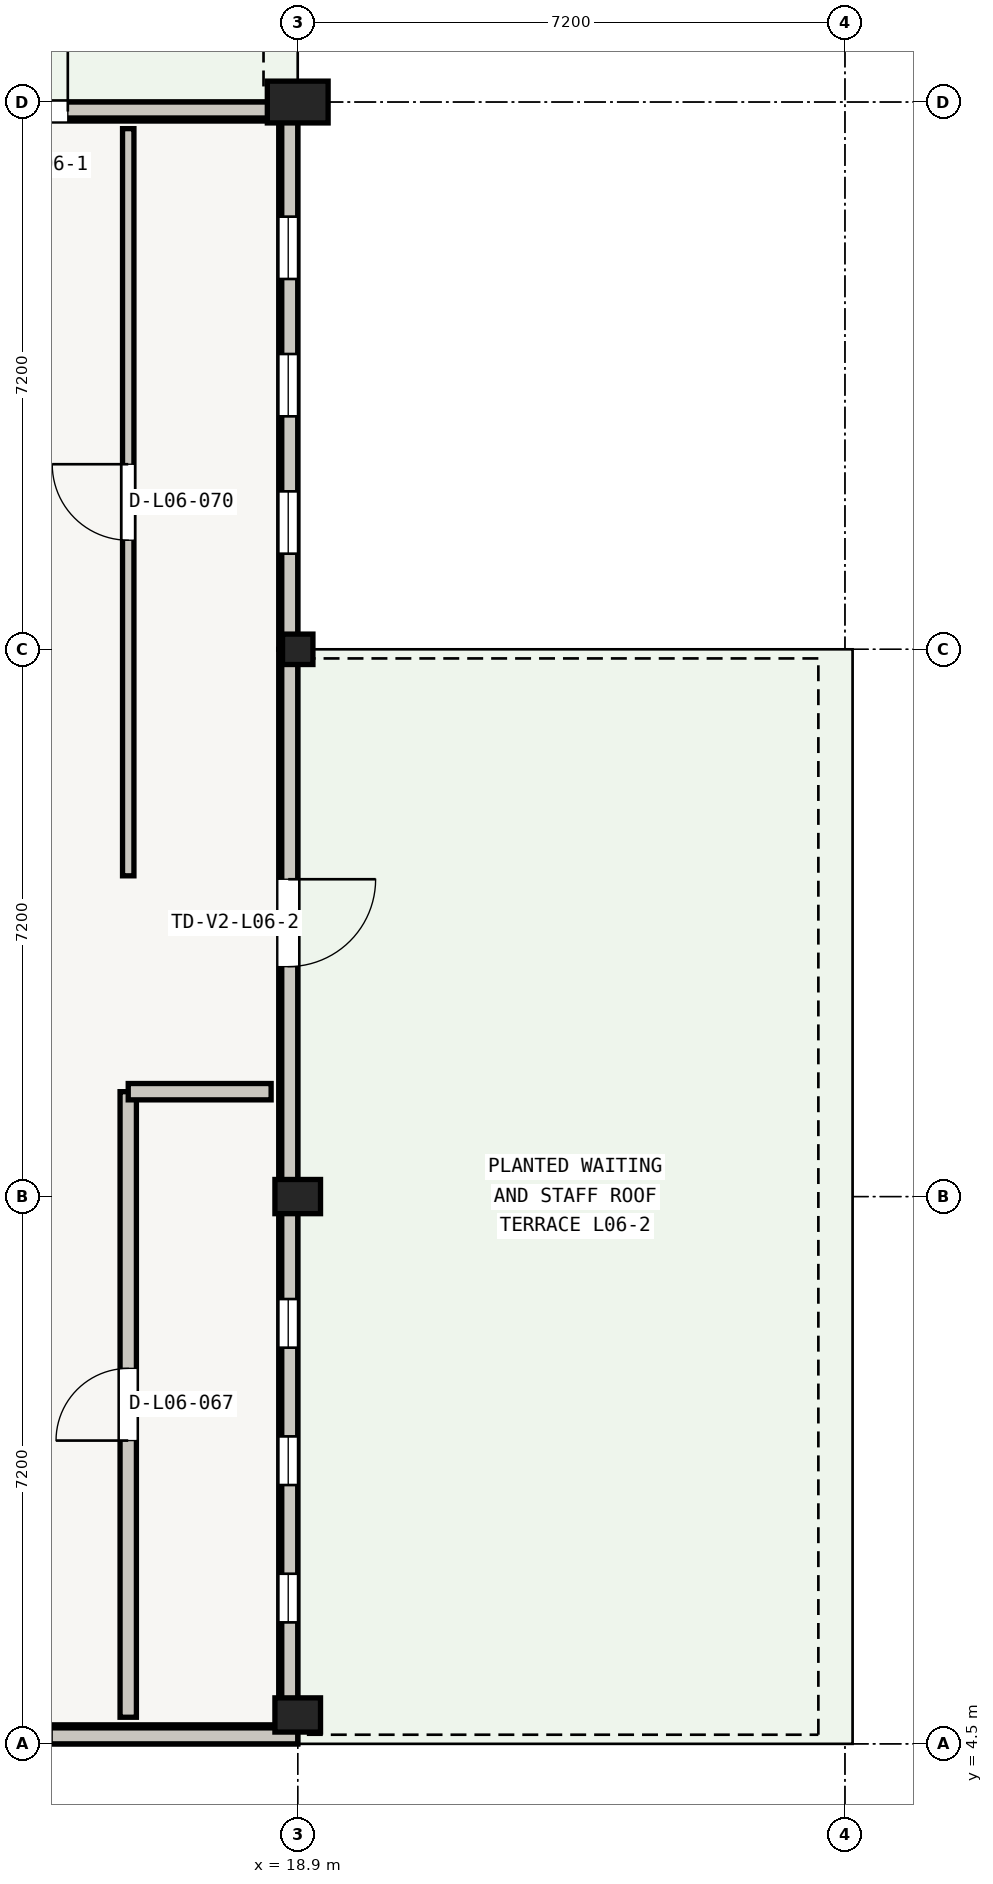
"""IFC4 building model, lengths in metres.
Left out: names, types, materials, properties, quantities, classifications, styles, units other than length and angle.
Written with IfcOpenShell. Run it as: python <this file> out.ifc"""

import sys

from ifc_helpers import new_model, si_unit, direction, frame, frame_2d, origin, origin_2d, place, context, subcontext, project, spatial, rectangle, extrude, element, fill, save


model = new_model("IFC4")
c1 = context("Model", 3, precision=1e-05, world=origin(), true_north=direction((0.0, 1.0)))
c2 = subcontext(c1, "Body", "Model", "MODEL_VIEW")
j1 = project(units=[si_unit("LENGTHUNIT", "METRE"), si_unit("PLANEANGLEUNIT", "RADIAN")], contexts=[c1])
p1 = place(None, origin())
s1 = spatial("IfcSite", under=j1, at=p1, CompositionType="ELEMENT")
p2 = place(p1, origin())
s2 = spatial("IfcBuilding", under=s1, at=p2, CompositionType="ELEMENT")
p3 = place(p2, frame((0.0, 0.0, 25.05)))
s3 = spatial("IfcBuildingStorey", under=s2, at=p3, CompositionType="ELEMENT", Elevation=25.05)
for number, where, z_axis, x_axis in (
    (1, (18.9, 4.88, 0.0), (0.0, 0.0, 1.0), (1.0, 0.0, 0.0)),
    (2, (18.9, 11.7, 0.0), (0.0, 0.0, 1.0), (1.0, 0.0, 0.0)),
):
    element("IfcColumn", number, at=place(p3, frame(where, z_axis=z_axis, x_axis=x_axis)), inside=s3, PredefinedType="COLUMN", context=c2, shape_type="SweptSolid", body=[
        extrude(rectangle(XDim=0.6, YDim=0.45, at=origin_2d()), origin(), (0.0, 0.0, 1.0), 3.66),
    ])
p4 = place(p3, frame((18.9, 18.9, 0.0), z_axis=(0.0, 0.0, 1.0), x_axis=(1.0, 0.0, 0.0)))
e3 = element("IfcColumn", 3, at=p4, inside=s3, PredefinedType="COLUMN", context=c2, shape_type="SweptSolid", body=[
    extrude(rectangle(XDim=0.4, YDim=0.4, at=origin_2d()), origin(), (0.0, 0.0, 1.0), 3.66),
])
p5 = place(p3, frame((18.9, 26.1, 0.0), z_axis=(0.0, 0.0, 1.0), x_axis=(1.0, 0.0, 0.0)))
e4 = element("IfcColumn", 4, at=p5, inside=s3, PredefinedType="COLUMN", context=c2, shape_type="SweptSolid", body=[
    extrude(rectangle(XDim=0.8, YDim=0.55, at=origin_2d()), origin(), (0.0, 0.0, 1.0), 3.66),
])
p6 = place(p3, frame((11.7, 25.975, 0.0), z_axis=(0.0, 0.0, 1.0), x_axis=(1.0, 0.0, 0.0)))
e5 = element("IfcWall", 5, at=p6, inside=s3, PredefinedType="STANDARD", context=c2, shape_type="SweptSolid", body=[
    extrude(rectangle(XDim=7.2, YDim=0.25, at=frame_2d((3.6, 0.0))), origin(), (0.0, 0.0, 1.0), 3.195),
])
p7 = place(p6, frame((3.025, 0.0, 0.19)))
e6 = element("IfcOpeningElement", 6, at=p7, cuts=e5, PredefinedType="OPENING", context=c2, shape_type="SweptSolid", body=[
    extrude(rectangle(XDim=1.15, YDim=2.02, at=frame_2d((0.575, 1.01))), frame((0.0, 0.125, 0.0), z_axis=(0.0, -1.0, 0.0), x_axis=(1.0, 0.0, 0.0)), (0.0, 0.0, 1.0), 0.25),
])
p8 = place(p3, frame((18.775, 25.85, 0.0), z_axis=(0.0, 0.0, 1.0), x_axis=(0.0, -1.0, 0.0)))
e7 = element("IfcWall", 7, at=p8, inside=s3, PredefinedType="STANDARD", context=c2, shape_type="SweptSolid", body=[
    extrude(rectangle(XDim=6.95, YDim=0.25, at=frame_2d((3.475, 0.0))), origin(), (0.0, 0.0, 1.0), 3.165),
])
p9 = place(p8, frame((1.258, 0.0, 0.55)))
e8 = element("IfcOpeningElement", 8, at=p9, cuts=e7, PredefinedType="OPENING", context=c2, shape_type="SweptSolid", body=[
    extrude(rectangle(XDim=0.82, YDim=2.2, at=frame_2d((0.41, 1.1))), frame((0.0, 0.125, 0.0), z_axis=(0.0, -1.0, 0.0), x_axis=(1.0, 0.0, 0.0)), (0.0, 0.0, 1.0), 0.25),
])
p10 = place(p8, frame((3.065, 0.0, 0.55)))
e9 = element("IfcOpeningElement", 9, at=p10, cuts=e7, PredefinedType="OPENING", context=c2, shape_type="SweptSolid", body=[
    extrude(rectangle(XDim=0.82, YDim=2.2, at=frame_2d((0.41, 1.1))), frame((0.0, 0.125, 0.0), z_axis=(0.0, -1.0, 0.0), x_axis=(1.0, 0.0, 0.0)), (0.0, 0.0, 1.0), 0.25),
])
p11 = place(p8, frame((4.872, 0.0, 0.55)))
e10 = element("IfcOpeningElement", 10, at=p11, cuts=e7, PredefinedType="OPENING", context=c2, shape_type="SweptSolid", body=[
    extrude(rectangle(XDim=0.82, YDim=2.2, at=frame_2d((0.41, 1.1))), frame((0.0, 0.125, 0.0), z_axis=(0.0, -1.0, 0.0), x_axis=(1.0, 0.0, 0.0)), (0.0, 0.0, 1.0), 0.25),
])
p12 = place(p3, frame((18.775, 18.9, 0.0), z_axis=(0.0, 0.0, 1.0), x_axis=(0.0, -1.0, 0.0)))
e11 = element("IfcWall", 11, at=p12, inside=s3, PredefinedType="STANDARD", context=c2, shape_type="SweptSolid", body=[
    extrude(rectangle(XDim=7.2, YDim=0.25, at=frame_2d((3.6, 0.0))), origin(), (0.0, 0.0, 1.0), 2.695),
])
p13 = place(p12, frame((3.025, 0.0, 0.19)))
e12 = element("IfcOpeningElement", 12, at=p13, cuts=e11, PredefinedType="OPENING", context=c2, shape_type="SweptSolid", body=[
    extrude(rectangle(XDim=1.15, YDim=2.02, at=frame_2d((0.575, 1.01))), frame((0.0, 0.125, 0.0), z_axis=(0.0, -1.0, 0.0), x_axis=(1.0, 0.0, 0.0)), (0.0, 0.0, 1.0), 0.25),
])
p14 = place(p3, frame((18.775, 11.7, 0.0), z_axis=(0.0, 0.0, 1.0), x_axis=(0.0, -1.0, 0.0)))
e13 = element("IfcWall", 13, at=p14, inside=s3, PredefinedType="STANDARD", context=c2, shape_type="SweptSolid", body=[
    extrude(rectangle(XDim=6.95, YDim=0.25, at=frame_2d((3.475, 0.0))), origin(), (0.0, 0.0, 1.0), 2.695),
])
p15 = place(p14, frame((1.348, 0.0, 0.6)))
e14 = element("IfcOpeningElement", 14, at=p15, cuts=e13, PredefinedType="OPENING", context=c2, shape_type="SweptSolid", body=[
    extrude(rectangle(XDim=0.64, YDim=1.85, at=frame_2d((0.32, 0.925))), frame((0.0, 0.125, 0.0), z_axis=(0.0, -1.0, 0.0), x_axis=(1.0, 0.0, 0.0)), (0.0, 0.0, 1.0), 0.25),
])
p16 = place(p14, frame((3.155, 0.0, 0.6)))
e15 = element("IfcOpeningElement", 15, at=p16, cuts=e13, PredefinedType="OPENING", context=c2, shape_type="SweptSolid", body=[
    extrude(rectangle(XDim=0.64, YDim=1.85, at=frame_2d((0.32, 0.925))), frame((0.0, 0.125, 0.0), z_axis=(0.0, -1.0, 0.0), x_axis=(1.0, 0.0, 0.0)), (0.0, 0.0, 1.0), 0.25),
])
p17 = place(p14, frame((4.962, 0.0, 0.6)))
e16 = element("IfcOpeningElement", 16, at=p17, cuts=e13, PredefinedType="OPENING", context=c2, shape_type="SweptSolid", body=[
    extrude(rectangle(XDim=0.64, YDim=1.85, at=frame_2d((0.32, 0.925))), frame((0.0, 0.125, 0.0), z_axis=(0.0, -1.0, 0.0), x_axis=(1.0, 0.0, 0.0)), (0.0, 0.0, 1.0), 0.25),
])
p18 = place(p3, frame((18.9, 4.625, 0.0), z_axis=(0.0, 0.0, 1.0), x_axis=(-1.0, 0.0, 0.0)))
e17 = element("IfcWall", 17, at=p18, inside=s3, PredefinedType="STANDARD", context=c2, shape_type="SweptSolid", body=[
    extrude(rectangle(XDim=7.2, YDim=0.25, at=frame_2d((3.6, 0.0))), origin(), (0.0, 0.0, 1.0), 2.695),
])
p19 = place(p18, frame((3.24, 0.0, 0.6)))
e18 = element("IfcOpeningElement", 18, at=p19, cuts=e17, PredefinedType="OPENING", context=c2, shape_type="SweptSolid", body=[
    extrude(rectangle(XDim=0.72, YDim=1.85, at=frame_2d((0.36, 0.925))), frame((0.0, 0.125, 0.0), z_axis=(0.0, -1.0, 0.0), x_axis=(1.0, 0.0, 0.0)), (0.0, 0.0, 1.0), 0.25),
])
p20 = place(p18, frame((4.362, 0.0, 0.6)))
e19 = element("IfcOpeningElement", 19, at=p20, cuts=e17, PredefinedType="OPENING", context=c2, shape_type="SweptSolid", body=[
    extrude(rectangle(XDim=0.72, YDim=1.85, at=frame_2d((0.36, 0.925))), frame((0.0, 0.125, 0.0), z_axis=(0.0, -1.0, 0.0), x_axis=(1.0, 0.0, 0.0)), (0.0, 0.0, 1.0), 0.25),
])
p21 = place(p3, frame((4.5, 25.995, 3.9), z_axis=(0.0, 0.0, 1.0), x_axis=(1.0, 0.0, 0.0)))
e20 = element("IfcWall", 20, at=p21, inside=s3, PredefinedType="PARAPET", context=c2, shape_type="SweptSolid", body=[
    extrude(rectangle(XDim=14.4, YDim=0.21, at=frame_2d((7.2, 0.0))), origin(), (0.0, 0.0, 1.0), 1.1),
])
p22 = place(p3, frame((18.795, 25.89, 3.9), z_axis=(0.0, 0.0, 1.0), x_axis=(0.0, -1.0, 0.0)))
e21 = element("IfcWall", 21, at=p22, inside=s3, PredefinedType="PARAPET", context=c2, shape_type="SweptSolid", body=[
    extrude(rectangle(XDim=21.18, YDim=0.21, at=frame_2d((10.59, 0.0))), origin(), (0.0, 0.0, 1.0), 1.1),
])
p23 = place(p3, frame((18.9, 4.605, 3.9), z_axis=(0.0, 0.0, 1.0), x_axis=(-1.0, 0.0, 0.0)))
e22 = element("IfcWall", 22, at=p23, inside=s3, PredefinedType="PARAPET", context=c2, shape_type="SweptSolid", body=[
    extrude(rectangle(XDim=14.4, YDim=0.21, at=frame_2d((7.2, 0.0))), origin(), (0.0, 0.0, 1.0), 1.1),
])
p24 = place(p3, frame((16.67, 4.85, 0.0), z_axis=(0.0, 0.0, 1.0), x_axis=(0.0, 1.0, 0.0)))
e23 = element("IfcWall", 23, at=p24, inside=s3, PredefinedType="PLUMBINGWALL", context=c2, shape_type="SweptSolid", body=[
    extrude(rectangle(XDim=8.23, YDim=0.215, at=frame_2d((4.115, 0.0))), origin(), (0.0, 0.0, 1.0), 2.64),
])
p25 = place(p24, frame((3.64, 0.0, 0.0)))
e24 = element("IfcOpeningElement", 24, at=p25, cuts=e23, PredefinedType="OPENING", context=c2, shape_type="SweptSolid", body=[
    extrude(rectangle(XDim=0.95, YDim=2.05, at=frame_2d((0.475, 1.025))), frame((0.0, 0.107, 0.0), z_axis=(0.0, -1.0, 0.0), x_axis=(1.0, 0.0, 0.0)), (0.0, 0.0, 1.0), 0.215),
])
p26 = place(p3, frame((16.67, 13.08, 0.0), z_axis=(0.0, 0.0, 1.0), x_axis=(1.0, 0.0, 0.0)))
e25 = element("IfcWall", 25, at=p26, inside=s3, PredefinedType="PLUMBINGWALL", context=c2, shape_type="SweptSolid", body=[
    extrude(rectangle(XDim=1.88, YDim=0.215, at=frame_2d((0.94, 0.0))), origin(), (0.0, 0.0, 1.0), 2.64),
])
p27 = place(p3, frame((16.67, 15.92, 0.0), z_axis=(0.0, 0.0, 1.0), x_axis=(0.0, 1.0, 0.0)))
e26 = element("IfcWall", 26, at=p27, inside=s3, PredefinedType="PARTITIONING", context=c2, shape_type="SweptSolid", body=[
    extrude(rectangle(XDim=9.83, YDim=0.15, at=frame_2d((4.915, 0.0))), origin(), (0.0, 0.0, 1.0), 2.64),
])
p28 = place(p27, frame((4.415, 0.0, 0.0)))
e27 = element("IfcOpeningElement", 27, at=p28, cuts=e26, PredefinedType="OPENING", context=c2, shape_type="SweptSolid", body=[
    extrude(rectangle(XDim=1.0, YDim=2.05, at=frame_2d((0.5, 1.025))), frame((0.0, 0.075, 0.0), z_axis=(0.0, -1.0, 0.0), x_axis=(1.0, 0.0, 0.0)), (0.0, 0.0, 1.0), 0.15),
])
p29 = place(p7, origin())
e28 = element("IfcDoor", 28, at=p29, inside=s3, OperationType="SINGLE_SWING_RIGHT", PredefinedType="DOOR", context=c2, shape_type="SweptSolid", body=[
    extrude(rectangle(XDim=1.15, YDim=2.02, at=frame_2d((0.575, 1.01))), frame((0.0, 0.025, 0.0), z_axis=(0.0, -1.0, 0.0), x_axis=(1.0, 0.0, 0.0)), (0.0, 0.0, 1.0), 0.05),
])
fill(e6, e28)
p30 = place(p9, origin())
e29 = element("IfcWindow", 29, at=p30, inside=s3, PartitioningType="SINGLE_PANEL", PredefinedType="WINDOW", context=c2, shape_type="SweptSolid", body=[
    extrude(rectangle(XDim=0.82, YDim=2.2, at=frame_2d((0.41, 1.1))), frame((0.0, 0.03, 0.0), z_axis=(0.0, -1.0, 0.0), x_axis=(1.0, 0.0, 0.0)), (0.0, 0.0, 1.0), 0.06),
])
fill(e8, e29)
p31 = place(p10, origin())
e30 = element("IfcWindow", 30, at=p31, inside=s3, PartitioningType="SINGLE_PANEL", PredefinedType="WINDOW", context=c2, shape_type="SweptSolid", body=[
    extrude(rectangle(XDim=0.82, YDim=2.2, at=frame_2d((0.41, 1.1))), frame((0.0, 0.03, 0.0), z_axis=(0.0, -1.0, 0.0), x_axis=(1.0, 0.0, 0.0)), (0.0, 0.0, 1.0), 0.06),
])
fill(e9, e30)
p32 = place(p11, origin())
e31 = element("IfcWindow", 31, at=p32, inside=s3, PartitioningType="SINGLE_PANEL", PredefinedType="WINDOW", context=c2, shape_type="SweptSolid", body=[
    extrude(rectangle(XDim=0.82, YDim=2.2, at=frame_2d((0.41, 1.1))), frame((0.0, 0.03, 0.0), z_axis=(0.0, -1.0, 0.0), x_axis=(1.0, 0.0, 0.0)), (0.0, 0.0, 1.0), 0.06),
])
fill(e10, e31)
p33 = place(p13, origin())
e32 = element("IfcDoor", 32, at=p33, inside=s3, OperationType="SINGLE_SWING_LEFT", PredefinedType="DOOR", context=c2, shape_type="SweptSolid", body=[
    extrude(rectangle(XDim=1.15, YDim=2.02, at=frame_2d((0.575, 1.01))), frame((0.0, 0.025, 0.0), z_axis=(0.0, -1.0, 0.0), x_axis=(1.0, 0.0, 0.0)), (0.0, 0.0, 1.0), 0.05),
])
fill(e12, e32)
p34 = place(p15, origin())
e33 = element("IfcWindow", 33, at=p34, inside=s3, PartitioningType="SINGLE_PANEL", PredefinedType="WINDOW", context=c2, shape_type="SweptSolid", body=[
    extrude(rectangle(XDim=0.64, YDim=1.85, at=frame_2d((0.32, 0.925))), frame((0.0, 0.03, 0.0), z_axis=(0.0, -1.0, 0.0), x_axis=(1.0, 0.0, 0.0)), (0.0, 0.0, 1.0), 0.06),
])
fill(e14, e33)
p35 = place(p16, origin())
e34 = element("IfcWindow", 34, at=p35, inside=s3, PartitioningType="SINGLE_PANEL", PredefinedType="WINDOW", context=c2, shape_type="SweptSolid", body=[
    extrude(rectangle(XDim=0.64, YDim=1.85, at=frame_2d((0.32, 0.925))), frame((0.0, 0.03, 0.0), z_axis=(0.0, -1.0, 0.0), x_axis=(1.0, 0.0, 0.0)), (0.0, 0.0, 1.0), 0.06),
])
fill(e15, e34)
p36 = place(p17, origin())
e35 = element("IfcWindow", 35, at=p36, inside=s3, PartitioningType="SINGLE_PANEL", PredefinedType="WINDOW", context=c2, shape_type="SweptSolid", body=[
    extrude(rectangle(XDim=0.64, YDim=1.85, at=frame_2d((0.32, 0.925))), frame((0.0, 0.03, 0.0), z_axis=(0.0, -1.0, 0.0), x_axis=(1.0, 0.0, 0.0)), (0.0, 0.0, 1.0), 0.06),
])
fill(e16, e35)
p37 = place(p25, origin())
e36 = element("IfcDoor", 36, at=p37, inside=s3, OperationType="SINGLE_SWING_LEFT", PredefinedType="DOOR", context=c2, shape_type="SweptSolid", body=[
    extrude(rectangle(XDim=0.95, YDim=2.05, at=frame_2d((0.475, 1.025))), frame((0.0, 0.025, 0.0), z_axis=(0.0, -1.0, 0.0), x_axis=(1.0, 0.0, 0.0)), (0.0, 0.0, 1.0), 0.05),
])
fill(e24, e36)
p38 = place(p28, origin())
e37 = element("IfcDoor", 37, at=p38, inside=s3, OperationType="SINGLE_SWING_RIGHT", PredefinedType="DOOR", context=c2, shape_type="SweptSolid", body=[
    extrude(rectangle(XDim=1.0, YDim=2.05, at=frame_2d((0.5, 1.025))), frame((0.0, 0.025, 0.0), z_axis=(0.0, -1.0, 0.0), x_axis=(1.0, 0.0, 0.0)), (0.0, 0.0, 1.0), 0.05),
])
fill(e27, e37)
save(model, sys.argv[1])
